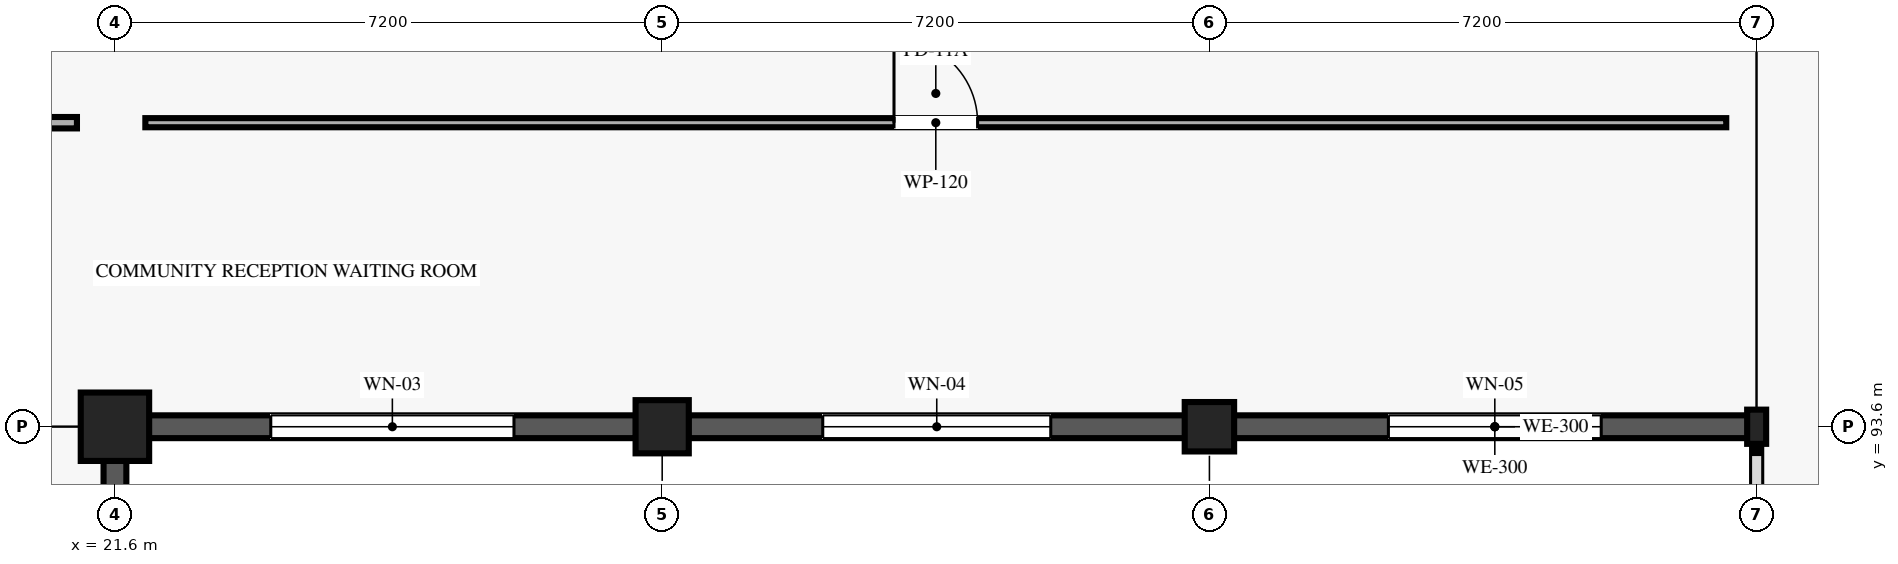
"""IFC4 building model, lengths in metres.
Left out: names, types, materials, properties, quantities, classifications, styles, units other than length and angle.
Written with IfcOpenShell. Run it as: python <this file> out.ifc"""

import sys

from ifc_helpers import new_model, si_unit, direction, frame, frame_2d, origin, origin_2d, place, context, subcontext, project, spatial, rectangle, i_section, extrude, element, fill, save


model = new_model("IFC4")
c1 = context("Model", 3, precision=1e-05, world=origin(), true_north=direction((0.0, 1.0)))
c2 = subcontext(c1, "Body", "Model", "MODEL_VIEW")
j1 = project(units=[si_unit("LENGTHUNIT", "METRE"), si_unit("PLANEANGLEUNIT", "RADIAN")], contexts=[c1])
p1 = place(None, origin())
s1 = spatial("IfcSite", under=j1, at=p1, CompositionType="ELEMENT")
p2 = place(p1, origin())
s2 = spatial("IfcBuilding", under=s1, at=p2, CompositionType="ELEMENT")
p3 = place(p2, origin())
s3 = spatial("IfcBuildingStorey", under=s2, at=p3, CompositionType="ELEMENT", Elevation=0.0)
p4 = place(p3, frame((21.6, 93.6, 0.0), z_axis=(0.0, 0.0, 1.0), x_axis=(1.0, 0.0, 0.0)))
e1 = element("IfcColumn", 1, at=p4, inside=s3, PredefinedType="COLUMN", context=c2, shape_type="SweptSolid", body=[
    extrude(rectangle(XDim=0.9, YDim=0.9, at=origin_2d()), origin(), (0.0, 0.0, 1.0), 5.4),
])
p5 = place(p3, frame((28.8, 93.6, 0.0), z_axis=(0.0, 0.0, 1.0), x_axis=(1.0, 0.0, 0.0)))
e2 = element("IfcColumn", 2, at=p5, inside=s3, PredefinedType="COLUMN", context=c2, shape_type="SweptSolid", body=[
    extrude(rectangle(XDim=0.7, YDim=0.7, at=origin_2d()), origin(), (0.0, 0.0, 1.0), 5.4),
])
p6 = place(p3, frame((36.0, 93.6, 0.0), z_axis=(0.0, 0.0, 1.0), x_axis=(1.0, 0.0, 0.0)))
e3 = element("IfcColumn", 3, at=p6, inside=s3, PredefinedType="COLUMN", context=c2, shape_type="SweptSolid", body=[
    extrude(rectangle(XDim=0.65, YDim=0.65, at=origin_2d()), origin(), (0.0, 0.0, 1.0), 5.4),
])
p7 = place(p3, frame((43.2, 93.6, 0.0), z_axis=(0.0, 0.0, 1.0), x_axis=(1.0, 0.0, 0.0)))
e4 = element("IfcColumn", 4, at=p7, inside=s3, PredefinedType="COLUMN", context=c2, shape_type="SweptSolid", body=[
    extrude(i_section(OverallWidth=0.25, OverallDepth=0.45, WebThickness=0.011, FlangeThickness=0.014, at=origin_2d()), origin(), (0.0, 0.0, 1.0), 5.4),
])
p8 = place(p3, frame((22.045, 93.6, 0.0), z_axis=(0.0, 0.0, 1.0), x_axis=(1.0, 0.0, 0.0)))
e5 = element("IfcWall", 5, at=p8, inside=s3, PredefinedType="SOLIDWALL", context=c2, shape_type="SweptSolid", body=[
    extrude(rectangle(XDim=6.41, YDim=0.3, at=frame_2d((3.205, 0.0))), origin(), (0.0, 0.0, 1.0), 5.16),
])
p9 = place(p8, frame((1.605, 0.0, 0.85)))
e6 = element("IfcOpeningElement", 6, at=p9, cuts=e5, PredefinedType="OPENING", context=c2, shape_type="SweptSolid", body=[
    extrude(rectangle(XDim=3.2, YDim=1.95, at=frame_2d((1.6, 0.975))), frame((0.0, 0.16, 0.0), z_axis=(0.0, -1.0, 0.0), x_axis=(1.0, 0.0, 0.0)), (0.0, 0.0, 1.0), 0.32),
])
p10 = place(p3, frame((29.145, 93.6, 0.0), z_axis=(0.0, 0.0, 1.0), x_axis=(1.0, 0.0, 0.0)))
e7 = element("IfcWall", 7, at=p10, inside=s3, PredefinedType="SOLIDWALL", context=c2, shape_type="SweptSolid", body=[
    extrude(rectangle(XDim=6.535, YDim=0.3, at=frame_2d((3.268, 0.0))), origin(), (0.0, 0.0, 1.0), 5.16),
])
p11 = place(p10, frame((1.768, 0.0, 0.85)))
e8 = element("IfcOpeningElement", 8, at=p11, cuts=e7, PredefinedType="OPENING", context=c2, shape_type="SweptSolid", body=[
    extrude(rectangle(XDim=3.0, YDim=1.9, at=frame_2d((1.5, 0.95))), frame((0.0, 0.16, 0.0), z_axis=(0.0, -1.0, 0.0), x_axis=(1.0, 0.0, 0.0)), (0.0, 0.0, 1.0), 0.32),
])
p12 = place(p3, frame((36.32, 93.6, 0.0), z_axis=(0.0, 0.0, 1.0), x_axis=(1.0, 0.0, 0.0)))
e9 = element("IfcWall", 9, at=p12, inside=s3, PredefinedType="SOLIDWALL", context=c2, shape_type="SweptSolid", body=[
    extrude(rectangle(XDim=6.87, YDim=0.3, at=frame_2d((3.435, 0.0))), origin(), (0.0, 0.0, 1.0), 5.16),
])
p13 = place(p12, frame((2.035, 0.0, 0.85)))
e10 = element("IfcOpeningElement", 10, at=p13, cuts=e9, PredefinedType="OPENING", context=c2, shape_type="SweptSolid", body=[
    extrude(rectangle(XDim=2.8, YDim=1.85, at=frame_2d((1.4, 0.925))), frame((0.0, 0.16, 0.0), z_axis=(0.0, -1.0, 0.0), x_axis=(1.0, 0.0, 0.0)), (0.0, 0.0, 1.0), 0.32),
])
p14 = place(p3, frame((21.6, 86.845, 0.0), z_axis=(0.0, 0.0, 1.0), x_axis=(0.0, 1.0, 0.0)))
e11 = element("IfcWall", 11, at=p14, inside=s3, PredefinedType="SOLIDWALL", context=c2, shape_type="SweptSolid", body=[
    extrude(rectangle(XDim=6.31, YDim=0.3, at=frame_2d((3.155, 0.0))), origin(), (0.0, 0.0, 1.0), 5.16),
])
p15 = place(p14, frame((1.455, 0.0, 0.85)))
e12 = element("IfcOpeningElement", 12, at=p15, cuts=e11, PredefinedType="OPENING", context=c2, shape_type="SweptSolid", body=[
    extrude(rectangle(XDim=3.4, YDim=2.0, at=frame_2d((1.7, 1.0))), frame((0.0, 0.16, 0.0), z_axis=(0.0, -1.0, 0.0), x_axis=(1.0, 0.0, 0.0)), (0.0, 0.0, 1.0), 0.32),
])
p16 = place(p3, frame((0.65, 97.6, 0.0), z_axis=(0.0, 0.0, 1.0), x_axis=(1.0, 0.0, 0.0)))
e13 = element("IfcWall", 13, at=p16, inside=s3, PredefinedType="PARTITIONING", context=c2, shape_type="SweptSolid", body=[
    extrude(rectangle(XDim=20.45, YDim=0.15, at=frame_2d((10.225, 0.0))), origin(), (0.0, 0.0, 1.0), 5.16),
])
p17 = place(p16, frame((16.34, 0.0, 0.0)))
e14 = element("IfcOpeningElement", 14, at=p17, cuts=e13, PredefinedType="OPENING", context=c2, shape_type="SweptSolid", body=[
    extrude(rectangle(XDim=2.1, YDim=2.4, at=frame_2d((1.05, 1.2))), frame((0.0, 0.085, 0.0), z_axis=(0.0, -1.0, 0.0), x_axis=(1.0, 0.0, 0.0)), (0.0, 0.0, 1.0), 0.17),
])
p18 = place(p3, frame((22.0, 97.6, 0.0), z_axis=(0.0, 0.0, 1.0), x_axis=(1.0, 0.0, 0.0)))
e15 = element("IfcWall", 15, at=p18, inside=s3, PredefinedType="PARTITIONING", context=c2, shape_type="SweptSolid", body=[
    extrude(rectangle(XDim=20.8, YDim=0.12, at=frame_2d((10.4, 0.0))), origin(), (0.0, 0.0, 1.0), 5.16),
])
p19 = place(p18, frame((9.85, 0.0, 0.0)))
e16 = element("IfcOpeningElement", 16, at=p19, cuts=e15, PredefinedType="OPENING", context=c2, shape_type="SweptSolid", body=[
    extrude(rectangle(XDim=1.1, YDim=2.2, at=frame_2d((0.55, 1.1))), frame((0.0, 0.07, 0.0), z_axis=(0.0, -1.0, 0.0), x_axis=(1.0, 0.0, 0.0)), (0.0, 0.0, 1.0), 0.14),
])
p20 = place(p9, origin())
e17 = element("IfcWindow", 17, at=p20, inside=s3, PartitioningType="SINGLE_PANEL", PredefinedType="WINDOW", context=c2, shape_type="SweptSolid", body=[
    extrude(rectangle(XDim=3.2, YDim=1.95, at=frame_2d((1.6, 0.975))), frame((0.0, 0.03, 0.0), z_axis=(0.0, -1.0, 0.0), x_axis=(1.0, 0.0, 0.0)), (0.0, 0.0, 1.0), 0.06),
])
fill(e6, e17)
p21 = place(p11, origin())
e18 = element("IfcWindow", 18, at=p21, inside=s3, PartitioningType="SINGLE_PANEL", PredefinedType="WINDOW", context=c2, shape_type="SweptSolid", body=[
    extrude(rectangle(XDim=3.0, YDim=1.9, at=frame_2d((1.5, 0.95))), frame((0.0, 0.03, 0.0), z_axis=(0.0, -1.0, 0.0), x_axis=(1.0, 0.0, 0.0)), (0.0, 0.0, 1.0), 0.06),
])
fill(e8, e18)
p22 = place(p13, origin())
e19 = element("IfcWindow", 19, at=p22, inside=s3, PartitioningType="SINGLE_PANEL", PredefinedType="WINDOW", context=c2, shape_type="SweptSolid", body=[
    extrude(rectangle(XDim=2.8, YDim=1.85, at=frame_2d((1.4, 0.925))), frame((0.0, 0.03, 0.0), z_axis=(0.0, -1.0, 0.0), x_axis=(1.0, 0.0, 0.0)), (0.0, 0.0, 1.0), 0.06),
])
fill(e10, e19)
p23 = place(p19, origin())
e20 = element("IfcDoor", 20, at=p23, inside=s3, OperationType="SINGLE_SWING_LEFT", PredefinedType="DOOR", context=c2, shape_type="SweptSolid", body=[
    extrude(rectangle(XDim=1.1, YDim=2.2, at=frame_2d((0.55, 1.1))), frame((0.0, 0.025, 0.0), z_axis=(0.0, -1.0, 0.0), x_axis=(1.0, 0.0, 0.0)), (0.0, 0.0, 1.0), 0.05),
])
fill(e16, e20)
save(model, sys.argv[1])
